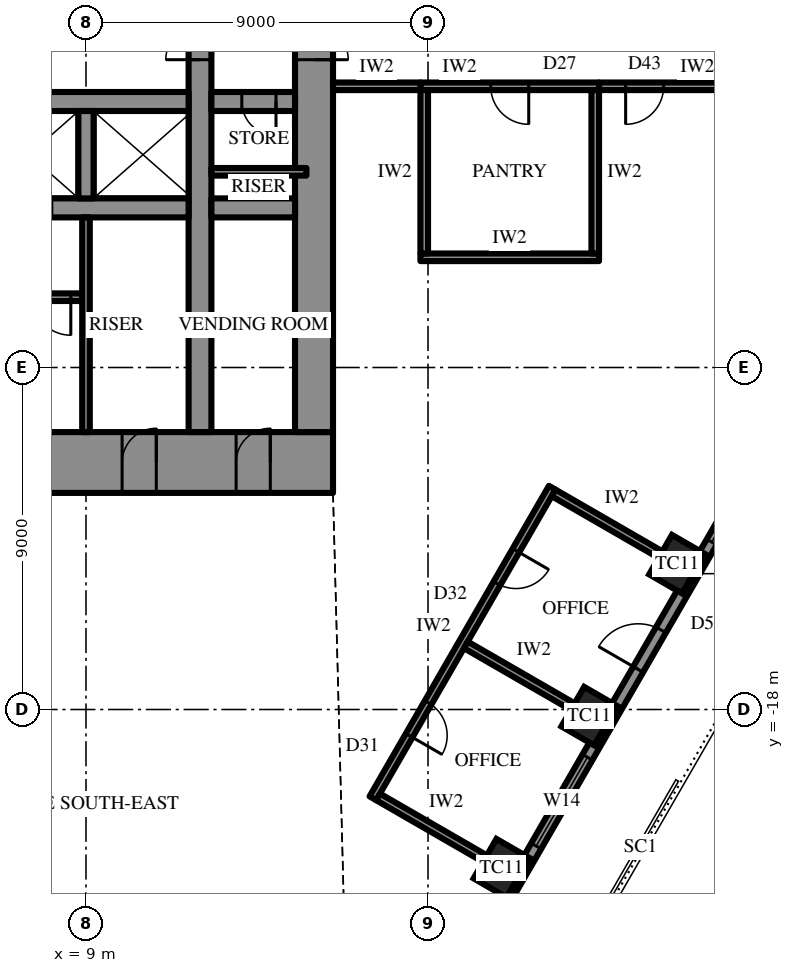
"""IFC4 building model, lengths in metres.
Left out: names, types, materials, properties, quantities, classifications, styles, units other than length and angle.
Written with IfcOpenShell. Run it as: python <this file> out.ifc"""

import sys

from ifc_helpers import new_model, si_unit, direction, frame, frame_2d, origin, origin_2d, place, context, subcontext, project, spatial, rectangle, extrude, element, fill, save


model = new_model("IFC4")
c1 = context("Model", 3, precision=1e-05, world=origin(), true_north=direction((0.0, 1.0)))
c2 = subcontext(c1, "Body", "Model", "MODEL_VIEW")
j1 = project(units=[si_unit("LENGTHUNIT", "METRE"), si_unit("PLANEANGLEUNIT", "RADIAN")], contexts=[c1])
p1 = place(None, origin())
s1 = spatial("IfcSite", under=j1, at=p1, CompositionType="ELEMENT")
p2 = place(p1, origin())
s2 = spatial("IfcBuilding", under=s1, at=p2, CompositionType="ELEMENT")
p3 = place(p2, frame((0.0, 0.0, 270.1)))
s3 = spatial("IfcBuildingStorey", under=s2, at=p3, CompositionType="ELEMENT", Elevation=270.1)
for number, where, z_axis, x_axis in (
    (1, (19.933, -22.175, 0.0), (0.0, 0.0, 1.0), (0.5, 0.866, 0.0)),
    (2, (22.242, -18.175, 0.0), (0.0, 0.0, 1.0), (0.5, 0.866, 0.0)),
    (3, (24.552, -14.175, 0.0), (0.0, 0.0, 1.0), (0.5, 0.866, 0.0)),
):
    element("IfcColumn", number, at=place(p3, frame(where, z_axis=z_axis, x_axis=x_axis)), inside=s3, PredefinedType="COLUMN", context=c2, shape_type="SweptSolid", body=[
        extrude(rectangle(XDim=1.2, YDim=1.0, at=origin_2d()), origin(), (0.0, 0.0, 1.0), 4.2),
    ])
p4 = place(p3, frame((15.5, -11.5, 0.0), z_axis=(0.0, 0.0, 1.0), x_axis=(-1.0, 0.0, 0.0)))
e4 = element("IfcWall", 4, at=p4, inside=s3, PredefinedType="SHEAR", context=c2, shape_type="SweptSolid", body=[
    extrude(rectangle(XDim=31.0, YDim=1.6, at=frame_2d((15.5, 0.0))), origin(), (0.0, 0.0, 1.0), 4.2),
])
p5 = place(p4, frame((16.35, 0.0, 0.0)))
e5 = element("IfcOpeningElement", 5, at=p5, cuts=e4, PredefinedType="OPENING", context=c2, shape_type="SweptSolid", body=[
    extrude(rectangle(XDim=0.9, YDim=2.2, at=frame_2d((0.45, 1.1))), frame((0.0, 0.81, 0.0), z_axis=(0.0, -1.0, 0.0), x_axis=(1.0, 0.0, 0.0)), (0.0, 0.0, 1.0), 1.62),
])
p6 = place(p4, frame((19.35, 0.0, 0.0)))
e6 = element("IfcOpeningElement", 6, at=p6, cuts=e4, PredefinedType="OPENING", context=c2, shape_type="SweptSolid", body=[
    extrude(rectangle(XDim=0.9, YDim=2.2, at=frame_2d((0.45, 1.1))), frame((0.0, 0.81, 0.0), z_axis=(0.0, -1.0, 0.0), x_axis=(1.0, 0.0, 0.0)), (0.0, 0.0, 1.0), 1.62),
])
p7 = place(p4, frame((22.4, 0.0, 0.0)))
e7 = element("IfcOpeningElement", 7, at=p7, cuts=e4, PredefinedType="OPENING", context=c2, shape_type="SweptSolid", body=[
    extrude(rectangle(XDim=1.0, YDim=2.2, at=frame_2d((0.5, 1.1))), frame((0.0, 0.81, 0.0), z_axis=(0.0, -1.0, 0.0), x_axis=(1.0, 0.0, 0.0)), (0.0, 0.0, 1.0), 1.62),
])
p8 = place(p4, frame((1.65, 0.0, 0.0)))
e8 = element("IfcOpeningElement", 8, at=p8, cuts=e4, PredefinedType="OPENING", context=c2, shape_type="SweptSolid", body=[
    extrude(rectangle(XDim=0.9, YDim=2.2, at=frame_2d((0.45, 1.1))), frame((0.0, 0.81, 0.0), z_axis=(0.0, -1.0, 0.0), x_axis=(1.0, 0.0, 0.0)), (0.0, 0.0, 1.0), 1.62),
])
p9 = place(p4, frame((4.65, 0.0, 0.0)))
e9 = element("IfcOpeningElement", 9, at=p9, cuts=e4, PredefinedType="OPENING", context=c2, shape_type="SweptSolid", body=[
    extrude(rectangle(XDim=0.9, YDim=2.2, at=frame_2d((0.45, 1.1))), frame((0.0, 0.81, 0.0), z_axis=(0.0, -1.0, 0.0), x_axis=(1.0, 0.0, 0.0)), (0.0, 0.0, 1.0), 1.62),
])
p10 = place(p4, frame((25.45, 0.0, 0.0)))
e10 = element("IfcOpeningElement", 10, at=p10, cuts=e4, PredefinedType="OPENING", context=c2, shape_type="SweptSolid", body=[
    extrude(rectangle(XDim=0.9, YDim=2.2, at=frame_2d((0.45, 1.1))), frame((0.0, 0.81, 0.0), z_axis=(0.0, -1.0, 0.0), x_axis=(1.0, 0.0, 0.0)), (0.0, 0.0, 1.0), 1.62),
])
p11 = place(p4, frame((28.45, 0.0, 0.0)))
e11 = element("IfcOpeningElement", 11, at=p11, cuts=e4, PredefinedType="OPENING", context=c2, shape_type="SweptSolid", body=[
    extrude(rectangle(XDim=0.9, YDim=2.2, at=frame_2d((0.45, 1.1))), frame((0.0, 0.81, 0.0), z_axis=(0.0, -1.0, 0.0), x_axis=(1.0, 0.0, 0.0)), (0.0, 0.0, 1.0), 1.62),
])
p12 = place(p3, frame((15.0, -10.7, 0.0), z_axis=(0.0, 0.0, 1.0), x_axis=(0.0, 1.0, 0.0)))
e12 = element("IfcWall", 12, at=p12, inside=s3, PredefinedType="SHEAR", context=c2, shape_type="SweptSolid", body=[
    extrude(rectangle(XDim=21.4, YDim=1.0, at=frame_2d((10.7, 0.0))), origin(), (0.0, 0.0, 1.0), 4.2),
])
p13 = place(p12, frame((9.8, 0.0, 0.0)))
e13 = element("IfcOpeningElement", 13, at=p13, cuts=e12, PredefinedType="OPENING", context=c2, shape_type="SweptSolid", body=[
    extrude(rectangle(XDim=1.8, YDim=2.4, at=frame_2d((0.9, 1.2))), frame((0.0, 0.51, 0.0), z_axis=(0.0, -1.0, 0.0), x_axis=(1.0, 0.0, 0.0)), (0.0, 0.0, 1.0), 1.02),
])
p14 = place(p3, frame((12.0, -10.7, 0.0), z_axis=(0.0, 0.0, 1.0), x_axis=(0.0, 1.0, 0.0)))
e14 = element("IfcWall", 14, at=p14, inside=s3, PredefinedType="SHEAR", context=c2, shape_type="SweptSolid", body=[
    extrude(rectangle(XDim=21.4, YDim=0.6, at=frame_2d((10.7, 0.0))), origin(), (0.0, 0.0, 1.0), 4.2),
])
p15 = place(p14, frame((9.8, 0.0, 0.0)))
e15 = element("IfcOpeningElement", 15, at=p15, cuts=e14, PredefinedType="OPENING", context=c2, shape_type="SweptSolid", body=[
    extrude(rectangle(XDim=1.8, YDim=2.4, at=frame_2d((0.9, 1.2))), frame((0.0, 0.31, 0.0), z_axis=(0.0, -1.0, 0.0), x_axis=(1.0, 0.0, 0.0)), (0.0, 0.0, 1.0), 0.62),
])
p16 = place(p3, frame((14.5, -2.0, 0.0), z_axis=(0.0, 0.0, 1.0), x_axis=(-1.0, 0.0, 0.0)))
e16 = element("IfcWall", 16, at=p16, inside=s3, PredefinedType="SHEAR", context=c2, shape_type="SweptSolid", body=[
    extrude(rectangle(XDim=2.2, YDim=0.5, at=frame_2d((1.1, 0.0))), origin(), (0.0, 0.0, 1.0), 4.2),
])
p17 = place(p16, frame((0.5, 0.0, 0.0)))
e17 = element("IfcOpeningElement", 17, at=p17, cuts=e16, PredefinedType="OPENING", context=c2, shape_type="SweptSolid", body=[
    extrude(rectangle(XDim=0.9, YDim=2.2, at=frame_2d((0.45, 1.1))), frame((0.0, 0.26, 0.0), z_axis=(0.0, -1.0, 0.0), x_axis=(1.0, 0.0, 0.0)), (0.0, 0.0, 1.0), 0.52),
])
p18 = place(p3, frame((11.7, -2.0, 0.0), z_axis=(0.0, 0.0, 1.0), x_axis=(-1.0, 0.0, 0.0)))
e18 = element("IfcWall", 18, at=p18, inside=s3, PredefinedType="SHEAR", context=c2, shape_type="SweptSolid", body=[
    extrude(rectangle(XDim=5.9, YDim=0.5, at=frame_2d((2.95, 0.0))), origin(), (0.0, 0.0, 1.0), 4.2),
])
p19 = place(p3, frame((14.5, -4.8, 0.0), z_axis=(0.0, 0.0, 1.0), x_axis=(-1.0, 0.0, 0.0)))
e19 = element("IfcWall", 19, at=p19, inside=s3, PredefinedType="SHEAR", context=c2, shape_type="SweptSolid", body=[
    extrude(rectangle(XDim=2.2, YDim=0.5, at=frame_2d((1.1, 0.0))), origin(), (0.0, 0.0, 1.0), 4.2),
])
p20 = place(p3, frame((11.7, -4.8, 0.0), z_axis=(0.0, 0.0, 1.0), x_axis=(-1.0, 0.0, 0.0)))
e20 = element("IfcWall", 20, at=p20, inside=s3, PredefinedType="SHEAR", context=c2, shape_type="SweptSolid", body=[
    extrude(rectangle(XDim=23.4, YDim=0.5, at=frame_2d((11.7, 0.0))), origin(), (0.0, 0.0, 1.0), 4.2),
])
p21 = place(p20, frame((6.6, 0.0, 0.0)))
e21 = element("IfcOpeningElement", 21, at=p21, cuts=e20, PredefinedType="OPENING", context=c2, shape_type="SweptSolid", body=[
    extrude(rectangle(XDim=1.2, YDim=2.2, at=frame_2d((0.6, 1.1))), frame((0.0, 0.26, 0.0), z_axis=(0.0, -1.0, 0.0), x_axis=(1.0, 0.0, 0.0)), (0.0, 0.0, 1.0), 0.52),
])
p22 = place(p20, frame((3.6, 0.0, 0.0)))
e22 = element("IfcOpeningElement", 22, at=p22, cuts=e20, PredefinedType="OPENING", context=c2, shape_type="SweptSolid", body=[
    extrude(rectangle(XDim=1.2, YDim=2.2, at=frame_2d((0.6, 1.1))), frame((0.0, 0.26, 0.0), z_axis=(0.0, -1.0, 0.0), x_axis=(1.0, 0.0, 0.0)), (0.0, 0.0, 1.0), 0.52),
])
p23 = place(p3, frame((9.0, -2.25, 0.0), z_axis=(0.0, 0.0, 1.0), x_axis=(0.0, -1.0, 0.0)))
e23 = element("IfcWall", 23, at=p23, inside=s3, PredefinedType="SHEAR", context=c2, shape_type="SweptSolid", body=[
    extrude(rectangle(XDim=2.3, YDim=0.4, at=frame_2d((1.15, 0.0))), origin(), (0.0, 0.0, 1.0), 4.2),
])
p24 = place(p3, frame((8.9, -7.15, 0.0), z_axis=(0.0, 0.0, 1.0), x_axis=(-1.0, 0.0, 0.0)))
e24 = element("IfcWall", 24, at=p24, inside=s3, PredefinedType="SHEAR", context=c2, shape_type="SweptSolid", body=[
    extrude(rectangle(XDim=8.6, YDim=0.2, at=frame_2d((4.3, 0.0))), origin(), (0.0, 0.0, 1.0), 4.2),
])
p25 = place(p24, frame((0.3, 0.0, 0.0)))
e25 = element("IfcOpeningElement", 25, at=p25, cuts=e24, PredefinedType="OPENING", context=c2, shape_type="SweptSolid", body=[
    extrude(rectangle(XDim=1.0, YDim=2.2, at=frame_2d((0.5, 1.1))), frame((0.0, 0.11, 0.0), z_axis=(0.0, -1.0, 0.0), x_axis=(1.0, 0.0, 0.0)), (0.0, 0.0, 1.0), 0.22),
])
p26 = place(p3, frame((18.707, -25.299, 0.0), z_axis=(0.0, 0.0, 1.0), x_axis=(0.500000442367, 0.866025148383, 0.0)))
e26 = element("IfcWall", 26, at=p26, inside=s3, PredefinedType="SOLIDWALL", context=c2, shape_type="SweptSolid", body=[
    extrude(rectangle(XDim=25.113, YDim=0.3, at=frame_2d((12.556, 0.0))), origin(), (0.0, 0.0, 1.0), 2.8),
])
p27 = place(p26, frame((4.278, 0.0, 0.6)))
e27 = element("IfcOpeningElement", 27, at=p27, cuts=e26, PredefinedType="OPENING", context=c2, shape_type="SweptSolid", body=[
    extrude(rectangle(XDim=2.7, YDim=1.95, at=frame_2d((1.35, 0.975))), frame((0.0, 0.16, 0.0), z_axis=(0.0, -1.0, 0.0), x_axis=(1.0, 0.0, 0.0)), (0.0, 0.0, 1.0), 0.32),
])
p28 = place(p26, frame((9.647, 0.0, 0.0)))
e28 = element("IfcOpeningElement", 28, at=p28, cuts=e26, PredefinedType="OPENING", context=c2, shape_type="SweptSolid", body=[
    extrude(rectangle(XDim=1.2, YDim=2.4, at=frame_2d((0.6, 1.2))), frame((0.0, 0.16, 0.0), z_axis=(0.0, -1.0, 0.0), x_axis=(1.0, 0.0, 0.0)), (0.0, 0.0, 1.0), 0.32),
])
p29 = place(p26, frame((13.516, 0.0, 0.6)))
e29 = element("IfcOpeningElement", 29, at=p29, cuts=e26, PredefinedType="OPENING", context=c2, shape_type="SweptSolid", body=[
    extrude(rectangle(XDim=2.7, YDim=1.95, at=frame_2d((1.35, 0.975))), frame((0.0, 0.16, 0.0), z_axis=(0.0, -1.0, 0.0), x_axis=(1.0, 0.0, 0.0)), (0.0, 0.0, 1.0), 0.32),
])
p30 = place(p26, frame((18.135, 0.0, 0.6)))
e30 = element("IfcOpeningElement", 30, at=p30, cuts=e26, PredefinedType="OPENING", context=c2, shape_type="SweptSolid", body=[
    extrude(rectangle(XDim=2.7, YDim=1.95, at=frame_2d((1.35, 0.975))), frame((0.0, 0.16, 0.0), z_axis=(0.0, -1.0, 0.0), x_axis=(1.0, 0.0, 0.0)), (0.0, 0.0, 1.0), 0.32),
])
p31 = place(p3, frame((9.0, -5.05, 0.0), z_axis=(0.0, 0.0, 1.0), x_axis=(0.0, -1.0, 0.0)))
e31 = element("IfcWall", 31, at=p31, inside=s3, PredefinedType="PARTITIONING", context=c2, shape_type="SweptSolid", body=[
    extrude(rectangle(XDim=5.65, YDim=0.2, at=frame_2d((2.825, 0.0))), origin(), (0.0, 0.0, 1.0), 4.0),
])
p32 = place(p3, frame((14.8, -3.85, 0.0), z_axis=(0.0, 0.0, 1.0), x_axis=(-1.0, 0.0, 0.0)))
e32 = element("IfcWall", 32, at=p32, inside=s3, PredefinedType="PARTITIONING", context=c2, shape_type="SweptSolid", body=[
    extrude(rectangle(XDim=2.5, YDim=0.2, at=frame_2d((1.25, 0.0))), origin(), (0.0, 0.0, 1.0), 4.0),
])
p33 = place(p3, frame((16.549, -20.337, 0.0), z_axis=(0.0, 0.0, 1.0), x_axis=(0.499989672313, 0.866031366395, 0.0)))
e33 = element("IfcWall", 33, at=p33, inside=s3, PredefinedType="PARTITIONING", context=c2, shape_type="SweptSolid", body=[
    extrude(rectangle(XDim=9.438, YDim=0.2, at=frame_2d((4.719, 0.0))), origin(), (0.0, 0.0, 1.0), 4.0),
])
p34 = place(p33, frame((1.909, 0.0, 0.0)))
e34 = element("IfcOpeningElement", 34, at=p34, cuts=e33, PredefinedType="OPENING", context=c2, shape_type="SweptSolid", body=[
    extrude(rectangle(XDim=1.0, YDim=2.2, at=frame_2d((0.5, 1.1))), frame((0.0, 0.11, 0.0), z_axis=(0.0, -1.0, 0.0), x_axis=(1.0, 0.0, 0.0)), (0.0, 0.0, 1.0), 0.22),
])
p35 = place(p33, frame((6.528, 0.0, 0.0)))
e35 = element("IfcOpeningElement", 35, at=p35, cuts=e33, PredefinedType="OPENING", context=c2, shape_type="SweptSolid", body=[
    extrude(rectangle(XDim=1.0, YDim=2.2, at=frame_2d((0.5, 1.1))), frame((0.0, 0.11, 0.0), z_axis=(0.0, -1.0, 0.0), x_axis=(1.0, 0.0, 0.0)), (0.0, 0.0, 1.0), 0.22),
])
for number, where, z_axis, x_axis in (
    (36, (16.685, -20.3, 0.0), (0.0, 0.0, 1.0), (0.866, -0.5, 0.0)),
    (37, (18.995, -16.3, 0.0), (0.0, 0.0, 1.0), (0.866, -0.5, 0.0)),
    (38, (21.304, -12.3, 0.0), (0.0, 0.0, 1.0), (0.866, -0.5, 0.0)),
):
    element("IfcWall", number, at=place(p3, frame(where, z_axis=z_axis, x_axis=x_axis)), inside=s3, PredefinedType="PARTITIONING", context=c2, shape_type="SweptSolid", body=[
        extrude(rectangle(XDim=3.25, YDim=0.2, at=frame_2d((1.625, 0.0))), origin(), (0.0, 0.0, 1.0), 3.082),
    ])
p36 = place(p3, frame((17.8, -1.6, 0.0), z_axis=(0.0, 0.0, 1.0), x_axis=(1.0, 0.0, 0.0)))
e39 = element("IfcWall", 39, at=p36, inside=s3, PredefinedType="PARTITIONING", context=c2, shape_type="SweptSolid", body=[
    extrude(rectangle(XDim=4.7, YDim=0.2, at=frame_2d((2.35, 0.0))), origin(), (0.0, 0.0, 1.0), 4.0),
])
p37 = place(p36, frame((1.85, 0.0, 0.0)))
e40 = element("IfcOpeningElement", 40, at=p37, cuts=e39, PredefinedType="OPENING", context=c2, shape_type="SweptSolid", body=[
    extrude(rectangle(XDim=1.0, YDim=2.2, at=frame_2d((0.5, 1.1))), frame((0.0, 0.11, 0.0), z_axis=(0.0, -1.0, 0.0), x_axis=(1.0, 0.0, 0.0)), (0.0, 0.0, 1.0), 0.22),
])
p38 = place(p3, frame((17.8, -6.1, 0.0), z_axis=(0.0, 0.0, 1.0), x_axis=(1.0, 0.0, 0.0)))
e41 = element("IfcWall", 41, at=p38, inside=s3, PredefinedType="PARTITIONING", context=c2, shape_type="SweptSolid", body=[
    extrude(rectangle(XDim=4.7, YDim=0.2, at=frame_2d((2.35, 0.0))), origin(), (0.0, 0.0, 1.0), 4.0),
])
for number, where, z_axis, x_axis in (
    (42, (17.9, -1.7, 0.0), (0.0, 0.0, 1.0), (0.0, -1.0, 0.0)),
    (43, (22.4, -1.7, 0.0), (0.0, 0.0, 1.0), (0.0, -1.0, 0.0)),
):
    element("IfcWall", number, at=place(p3, frame(where, z_axis=z_axis, x_axis=x_axis)), inside=s3, PredefinedType="PARTITIONING", context=c2, shape_type="SweptSolid", body=[
        extrude(rectangle(XDim=4.3, YDim=0.2, at=frame_2d((2.15, 0.0))), origin(), (0.0, 0.0, 1.0), 4.0),
    ])
p39 = place(p3, frame((15.5, -1.6, 0.0), z_axis=(0.0, 0.0, 1.0), x_axis=(1.0, 0.0, 0.0)))
e44 = element("IfcWall", 44, at=p39, inside=s3, PredefinedType="PARTITIONING", context=c2, shape_type="SweptSolid", body=[
    extrude(rectangle(XDim=2.3, YDim=0.2, at=frame_2d((1.15, 0.0))), origin(), (0.0, 0.0, 1.0), 4.0),
])
p40 = place(p3, frame((22.5, -1.6, 0.0), z_axis=(0.0, 0.0, 1.0), x_axis=(1.0, 0.0, 0.0)))
e45 = element("IfcWall", 45, at=p40, inside=s3, PredefinedType="PARTITIONING", context=c2, shape_type="SweptSolid", body=[
    extrude(rectangle(XDim=3.7, YDim=0.2, at=frame_2d((1.85, 0.0))), origin(), (0.0, 0.0, 1.0), 4.0),
])
p41 = place(p40, frame((0.7, 0.0, 0.0)))
e46 = element("IfcOpeningElement", 46, at=p41, cuts=e45, PredefinedType="OPENING", context=c2, shape_type="SweptSolid", body=[
    extrude(rectangle(XDim=1.0, YDim=2.2, at=frame_2d((0.5, 1.1))), frame((0.0, 0.11, 0.0), z_axis=(0.0, -1.0, 0.0), x_axis=(1.0, 0.0, 0.0)), (0.0, 0.0, 1.0), 0.22),
])
p42 = place(p27, origin())
e47 = element("IfcWindow", 47, at=p42, inside=s3, PartitioningType="SINGLE_PANEL", PredefinedType="WINDOW", context=c2, shape_type="SweptSolid", body=[
    extrude(rectangle(XDim=2.7, YDim=1.95, at=frame_2d((1.35, 0.975))), frame((0.0, 0.03, 0.0), z_axis=(0.0, -1.0, 0.0), x_axis=(1.0, 0.0, 0.0)), (0.0, 0.0, 1.0), 0.06),
])
fill(e27, e47)
p43 = place(p28, origin())
e48 = element("IfcDoor", 48, at=p43, inside=s3, OperationType="SINGLE_SWING_RIGHT", PredefinedType="DOOR", context=c2, shape_type="SweptSolid", body=[
    extrude(rectangle(XDim=1.2, YDim=2.4, at=frame_2d((0.6, 1.2))), frame((0.0, 0.025, 0.0), z_axis=(0.0, -1.0, 0.0), x_axis=(1.0, 0.0, 0.0)), (0.0, 0.0, 1.0), 0.05),
])
fill(e28, e48)
p44 = place(p29, origin())
e49 = element("IfcWindow", 49, at=p44, inside=s3, PartitioningType="SINGLE_PANEL", PredefinedType="WINDOW", context=c2, shape_type="SweptSolid", body=[
    extrude(rectangle(XDim=2.7, YDim=1.95, at=frame_2d((1.35, 0.975))), frame((0.0, 0.03, 0.0), z_axis=(0.0, -1.0, 0.0), x_axis=(1.0, 0.0, 0.0)), (0.0, 0.0, 1.0), 0.06),
])
fill(e29, e49)
p45 = place(p13, frame((1.8, 0.0, 0.0), z_axis=(0.0, 0.0, 1.0), x_axis=(-1.0, 0.0, 0.0)))
e50 = element("IfcDoor", 50, at=p45, inside=s3, OperationType="DOUBLE_DOOR_SINGLE_SWING", PredefinedType="DOOR", context=c2, shape_type="SweptSolid", body=[
    extrude(rectangle(XDim=1.8, YDim=2.4, at=frame_2d((0.9, 1.2))), frame((0.0, 0.025, 0.0), z_axis=(0.0, -1.0, 0.0), x_axis=(1.0, 0.0, 0.0)), (0.0, 0.0, 1.0), 0.05),
])
fill(e13, e50)
p46 = place(p25, origin())
e51 = element("IfcDoor", 51, at=p46, inside=s3, OperationType="SINGLE_SWING_RIGHT", PredefinedType="DOOR", context=c2, shape_type="SweptSolid", body=[
    extrude(rectangle(XDim=1.0, YDim=2.2, at=frame_2d((0.5, 1.1))), frame((0.0, 0.025, 0.0), z_axis=(0.0, -1.0, 0.0), x_axis=(1.0, 0.0, 0.0)), (0.0, 0.0, 1.0), 0.05),
])
fill(e25, e51)
p47 = place(p8, frame((0.9, 0.0, 0.0), z_axis=(0.0, 0.0, 1.0), x_axis=(-1.0, 0.0, 0.0)))
e52 = element("IfcDoor", 52, at=p47, inside=s3, OperationType="SINGLE_SWING_LEFT", PredefinedType="DOOR", context=c2, shape_type="SweptSolid", body=[
    extrude(rectangle(XDim=0.9, YDim=2.2, at=frame_2d((0.45, 1.1))), frame((0.0, 0.025, 0.0), z_axis=(0.0, -1.0, 0.0), x_axis=(1.0, 0.0, 0.0)), (0.0, 0.0, 1.0), 0.05),
])
fill(e8, e52)
p48 = place(p9, frame((0.9, 0.0, 0.0), z_axis=(0.0, 0.0, 1.0), x_axis=(-1.0, 0.0, 0.0)))
e53 = element("IfcDoor", 53, at=p48, inside=s3, OperationType="SINGLE_SWING_LEFT", PredefinedType="DOOR", context=c2, shape_type="SweptSolid", body=[
    extrude(rectangle(XDim=0.9, YDim=2.2, at=frame_2d((0.45, 1.1))), frame((0.0, 0.025, 0.0), z_axis=(0.0, -1.0, 0.0), x_axis=(1.0, 0.0, 0.0)), (0.0, 0.0, 1.0), 0.05),
])
fill(e9, e53)
p49 = place(p17, origin())
e54 = element("IfcDoor", 54, at=p49, inside=s3, OperationType="SINGLE_SWING_RIGHT", PredefinedType="DOOR", context=c2, shape_type="SweptSolid", body=[
    extrude(rectangle(XDim=0.9, YDim=2.2, at=frame_2d((0.45, 1.1))), frame((0.0, 0.025, 0.0), z_axis=(0.0, -1.0, 0.0), x_axis=(1.0, 0.0, 0.0)), (0.0, 0.0, 1.0), 0.05),
])
fill(e17, e54)
p50 = place(p15, origin())
e55 = element("IfcDoor", 55, at=p50, inside=s3, OperationType="DOUBLE_DOOR_SINGLE_SWING", PredefinedType="DOOR", context=c2, shape_type="SweptSolid", body=[
    extrude(rectangle(XDim=1.8, YDim=2.4, at=frame_2d((0.9, 1.2))), frame((0.0, 0.025, 0.0), z_axis=(0.0, -1.0, 0.0), x_axis=(1.0, 0.0, 0.0)), (0.0, 0.0, 1.0), 0.05),
])
fill(e15, e55)
p51 = place(p34, frame((1.0, 0.0, 0.0), z_axis=(0.0, 0.0, 1.0), x_axis=(-1.0, 0.0, 0.0)))
e56 = element("IfcDoor", 56, at=p51, inside=s3, OperationType="SINGLE_SWING_LEFT", PredefinedType="DOOR", context=c2, shape_type="SweptSolid", body=[
    extrude(rectangle(XDim=1.0, YDim=2.2, at=frame_2d((0.5, 1.1))), frame((0.0, 0.025, 0.0), z_axis=(0.0, -1.0, 0.0), x_axis=(1.0, 0.0, 0.0)), (0.0, 0.0, 1.0), 0.05),
])
fill(e34, e56)
p52 = place(p35, frame((1.0, 0.0, 0.0), z_axis=(0.0, 0.0, 1.0), x_axis=(-1.0, 0.0, 0.0)))
e57 = element("IfcDoor", 57, at=p52, inside=s3, OperationType="SINGLE_SWING_RIGHT", PredefinedType="DOOR", context=c2, shape_type="SweptSolid", body=[
    extrude(rectangle(XDim=1.0, YDim=2.2, at=frame_2d((0.5, 1.1))), frame((0.0, 0.025, 0.0), z_axis=(0.0, -1.0, 0.0), x_axis=(1.0, 0.0, 0.0)), (0.0, 0.0, 1.0), 0.05),
])
fill(e35, e57)
p53 = place(p37, frame((1.0, 0.0, 0.0), z_axis=(0.0, 0.0, 1.0), x_axis=(-1.0, 0.0, 0.0)))
e58 = element("IfcDoor", 58, at=p53, inside=s3, OperationType="SINGLE_SWING_RIGHT", PredefinedType="DOOR", context=c2, shape_type="SweptSolid", body=[
    extrude(rectangle(XDim=1.0, YDim=2.2, at=frame_2d((0.5, 1.1))), frame((0.0, 0.025, 0.0), z_axis=(0.0, -1.0, 0.0), x_axis=(1.0, 0.0, 0.0)), (0.0, 0.0, 1.0), 0.05),
])
fill(e40, e58)
p54 = place(p41, frame((1.0, 0.0, 0.0), z_axis=(0.0, 0.0, 1.0), x_axis=(-1.0, 0.0, 0.0)))
e59 = element("IfcDoor", 59, at=p54, inside=s3, OperationType="SINGLE_SWING_LEFT", PredefinedType="DOOR", context=c2, shape_type="SweptSolid", body=[
    extrude(rectangle(XDim=1.0, YDim=2.2, at=frame_2d((0.5, 1.1))), frame((0.0, 0.025, 0.0), z_axis=(0.0, -1.0, 0.0), x_axis=(1.0, 0.0, 0.0)), (0.0, 0.0, 1.0), 0.05),
])
fill(e46, e59)
save(model, sys.argv[1])
